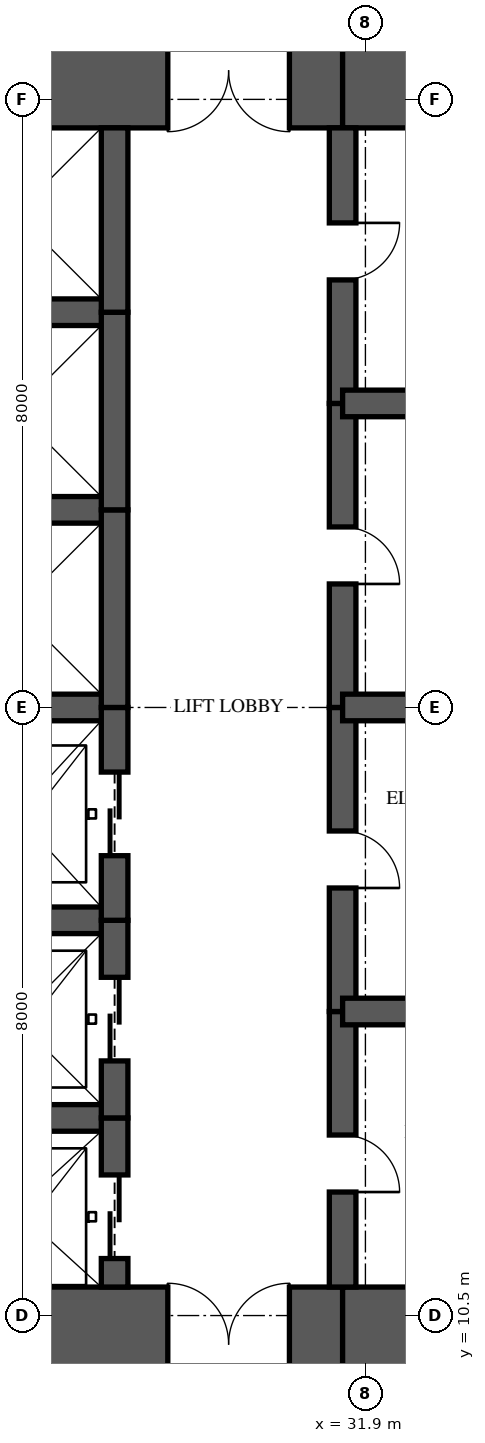
"""IFC4 building model, lengths in metres.
Left out: names, types, materials, properties, quantities, classifications, styles, units other than length and angle.
Written with IfcOpenShell. Run it as: python <this file> out.ifc"""

import sys

from ifc_helpers import new_model, si_unit, direction, frame, frame_2d, origin, place, context, subcontext, project, spatial, rectangle, extrude, element, fill, save


model = new_model("IFC4")
c1 = context("Model", 3, precision=1e-05, world=origin(), true_north=direction((0.0, 1.0)))
c2 = subcontext(c1, "Body", "Model", "MODEL_VIEW")
j1 = project(units=[si_unit("LENGTHUNIT", "METRE"), si_unit("PLANEANGLEUNIT", "RADIAN")], contexts=[c1])
p1 = place(None, origin())
s1 = spatial("IfcSite", under=j1, at=p1, CompositionType="ELEMENT")
p2 = place(p1, origin())
s2 = spatial("IfcBuilding", under=s1, at=p2, CompositionType="ELEMENT")
p3 = place(p2, frame((0.0, 0.0, 124.95)))
s3 = spatial("IfcBuildingStorey", under=s2, at=p3, CompositionType="ELEMENT", Elevation=124.95)
p4 = place(p3, frame((26.0, 10.125, 0.0), z_axis=(0.0, 0.0, 1.0), x_axis=(1.0, 0.0, 0.0)))
e1 = element("IfcWall", 1, at=p4, inside=s3, PredefinedType="SHEAR", context=c2, shape_type="SweptSolid", body=[
    extrude(rectangle(XDim=5.6, YDim=1.5, at=frame_2d((2.8, 0.0))), origin(), (0.0, 0.0, 1.0), 3.35),
])
p5 = place(p4, frame((3.3, 0.0, 0.0)))
e2 = element("IfcOpeningElement", 2, at=p5, cuts=e1, PredefinedType="OPENING", context=c2, shape_type="SweptSolid", body=[
    extrude(rectangle(XDim=1.6, YDim=2.1, at=frame_2d((0.8, 1.05))), frame((0.0, 0.76, 0.0), z_axis=(0.0, -1.0, 0.0), x_axis=(1.0, 0.0, 0.0)), (0.0, 0.0, 1.0), 1.52),
])
for number, where, z_axis, x_axis in (
    (3, (31.6, 10.125, 0.0), (0.0, 0.0, 1.0), (1.0, 0.0, 0.0)),
    (4, (35.9, 26.875, 0.0), (0.0, 0.0, 1.0), (-1.0, 0.0, 0.0)),
):
    element("IfcWall", number, at=place(p3, frame(where, z_axis=z_axis, x_axis=x_axis)), inside=s3, PredefinedType="SHEAR", context=c2, shape_type="SweptSolid", body=[
        extrude(rectangle(XDim=4.3, YDim=1.5, at=frame_2d((2.15, 0.0))), origin(), (0.0, 0.0, 1.0), 3.35),
    ])
p6 = place(p3, frame((31.6, 26.875, 0.0), z_axis=(0.0, 0.0, 1.0), x_axis=(-1.0, 0.0, 0.0)))
e5 = element("IfcWall", 5, at=p6, inside=s3, PredefinedType="SHEAR", context=c2, shape_type="SweptSolid", body=[
    extrude(rectangle(XDim=5.6, YDim=1.5, at=frame_2d((2.8, 0.0))), origin(), (0.0, 0.0, 1.0), 3.35),
])
p7 = place(p6, frame((0.7, 0.0, 0.0)))
e6 = element("IfcOpeningElement", 6, at=p7, cuts=e5, PredefinedType="OPENING", context=c2, shape_type="SweptSolid", body=[
    extrude(rectangle(XDim=1.6, YDim=2.1, at=frame_2d((0.8, 1.05))), frame((0.0, 0.76, 0.0), z_axis=(0.0, -1.0, 0.0), x_axis=(1.0, 0.0, 0.0)), (0.0, 0.0, 1.0), 1.52),
])
p8 = place(p3, frame((28.6, 10.875, 0.0), z_axis=(0.0, 0.0, 1.0), x_axis=(0.0, 1.0, 0.0)))
e7 = element("IfcWall", 7, at=p8, inside=s3, PredefinedType="SHEAR", context=c2, shape_type="SweptSolid", body=[
    extrude(rectangle(XDim=2.225, YDim=0.35, at=frame_2d((1.113, 0.0))), origin(), (0.0, 0.0, 1.0), 3.35),
])
p9 = place(p8, frame((0.375, 0.0, 0.0)))
e8 = element("IfcOpeningElement", 8, at=p9, cuts=e7, PredefinedType="OPENING", context=c2, shape_type="SweptSolid", body=[
    extrude(rectangle(XDim=1.1, YDim=2.1, at=frame_2d((0.55, 1.05))), frame((0.0, 0.185, 0.0), z_axis=(0.0, -1.0, 0.0), x_axis=(1.0, 0.0, 0.0)), (0.0, 0.0, 1.0), 0.37),
])
p10 = place(p3, frame((28.6, 13.1, 0.0), z_axis=(0.0, 0.0, 1.0), x_axis=(0.0, 1.0, 0.0)))
e9 = element("IfcWall", 9, at=p10, inside=s3, PredefinedType="SHEAR", context=c2, shape_type="SweptSolid", body=[
    extrude(rectangle(XDim=2.6, YDim=0.35, at=frame_2d((1.3, 0.0))), origin(), (0.0, 0.0, 1.0), 3.35),
])
p11 = place(p10, frame((0.75, 0.0, 0.0)))
e10 = element("IfcOpeningElement", 10, at=p11, cuts=e9, PredefinedType="OPENING", context=c2, shape_type="SweptSolid", body=[
    extrude(rectangle(XDim=1.1, YDim=2.1, at=frame_2d((0.55, 1.05))), frame((0.0, 0.185, 0.0), z_axis=(0.0, -1.0, 0.0), x_axis=(1.0, 0.0, 0.0)), (0.0, 0.0, 1.0), 0.37),
])
p12 = place(p3, frame((28.6, 15.7, 0.0), z_axis=(0.0, 0.0, 1.0), x_axis=(0.0, 1.0, 0.0)))
e11 = element("IfcWall", 11, at=p12, inside=s3, PredefinedType="SHEAR", context=c2, shape_type="SweptSolid", body=[
    extrude(rectangle(XDim=2.8, YDim=0.35, at=frame_2d((1.4, 0.0))), origin(), (0.0, 0.0, 1.0), 3.35),
])
p13 = place(p12, frame((0.85, 0.0, 0.0)))
e12 = element("IfcOpeningElement", 12, at=p13, cuts=e11, PredefinedType="OPENING", context=c2, shape_type="SweptSolid", body=[
    extrude(rectangle(XDim=1.1, YDim=2.1, at=frame_2d((0.55, 1.05))), frame((0.0, 0.185, 0.0), z_axis=(0.0, -1.0, 0.0), x_axis=(1.0, 0.0, 0.0)), (0.0, 0.0, 1.0), 0.37),
])
p14 = place(p3, frame((28.6, 18.5, 0.0), z_axis=(0.0, 0.0, 1.0), x_axis=(0.0, 1.0, 0.0)))
e13 = element("IfcWall", 13, at=p14, inside=s3, PredefinedType="SHEAR", context=c2, shape_type="SweptSolid", body=[
    extrude(rectangle(XDim=2.6, YDim=0.35, at=frame_2d((1.3, 0.0))), origin(), (0.0, 0.0, 1.0), 3.35),
])
p15 = place(p3, frame((28.6, 21.1, 0.0), z_axis=(0.0, 0.0, 1.0), x_axis=(0.0, 1.0, 0.0)))
e14 = element("IfcWall", 14, at=p15, inside=s3, PredefinedType="SHEAR", context=c2, shape_type="SweptSolid", body=[
    extrude(rectangle(XDim=2.6, YDim=0.35, at=frame_2d((1.3, 0.0))), origin(), (0.0, 0.0, 1.0), 3.35),
])
p16 = place(p3, frame((28.6, 23.7, 0.0), z_axis=(0.0, 0.0, 1.0), x_axis=(0.0, 1.0, 0.0)))
e15 = element("IfcWall", 15, at=p16, inside=s3, PredefinedType="SHEAR", context=c2, shape_type="SweptSolid", body=[
    extrude(rectangle(XDim=2.425, YDim=0.35, at=frame_2d((1.212, 0.0))), origin(), (0.0, 0.0, 1.0), 3.35),
])
p17 = place(p3, frame((31.6, 10.875, 0.0), z_axis=(0.0, 0.0, 1.0), x_axis=(0.0, 1.0, 0.0)))
e16 = element("IfcWall", 16, at=p17, inside=s3, PredefinedType="SHEAR", context=c2, shape_type="SweptSolid", body=[
    extrude(rectangle(XDim=3.625, YDim=0.35, at=frame_2d((1.812, 0.0))), origin(), (0.0, 0.0, 1.0), 3.35),
])
p18 = place(p17, frame((1.25, 0.0, 0.0)))
e17 = element("IfcOpeningElement", 17, at=p18, cuts=e16, PredefinedType="OPENING", context=c2, shape_type="SweptSolid", body=[
    extrude(rectangle(XDim=0.75, YDim=2.1, at=frame_2d((0.375, 1.05))), frame((0.0, 0.185, 0.0), z_axis=(0.0, -1.0, 0.0), x_axis=(1.0, 0.0, 0.0)), (0.0, 0.0, 1.0), 0.37),
])
p19 = place(p3, frame((31.6, 14.5, 0.0), z_axis=(0.0, 0.0, 1.0), x_axis=(0.0, 1.0, 0.0)))
e18 = element("IfcWall", 18, at=p19, inside=s3, PredefinedType="SHEAR", context=c2, shape_type="SweptSolid", body=[
    extrude(rectangle(XDim=4.0, YDim=0.35, at=frame_2d((2.0, 0.0))), origin(), (0.0, 0.0, 1.0), 3.35),
])
p20 = place(p19, frame((1.625, 0.0, 0.0)))
e19 = element("IfcOpeningElement", 19, at=p20, cuts=e18, PredefinedType="OPENING", context=c2, shape_type="SweptSolid", body=[
    extrude(rectangle(XDim=0.75, YDim=2.1, at=frame_2d((0.375, 1.05))), frame((0.0, 0.185, 0.0), z_axis=(0.0, -1.0, 0.0), x_axis=(1.0, 0.0, 0.0)), (0.0, 0.0, 1.0), 0.37),
])
p21 = place(p3, frame((31.6, 18.5, 0.0), z_axis=(0.0, 0.0, 1.0), x_axis=(0.0, 1.0, 0.0)))
e20 = element("IfcWall", 20, at=p21, inside=s3, PredefinedType="SHEAR", context=c2, shape_type="SweptSolid", body=[
    extrude(rectangle(XDim=4.0, YDim=0.35, at=frame_2d((2.0, 0.0))), origin(), (0.0, 0.0, 1.0), 3.35),
])
p22 = place(p21, frame((1.625, 0.0, 0.0)))
e21 = element("IfcOpeningElement", 21, at=p22, cuts=e20, PredefinedType="OPENING", context=c2, shape_type="SweptSolid", body=[
    extrude(rectangle(XDim=0.75, YDim=2.1, at=frame_2d((0.375, 1.05))), frame((0.0, 0.185, 0.0), z_axis=(0.0, -1.0, 0.0), x_axis=(1.0, 0.0, 0.0)), (0.0, 0.0, 1.0), 0.37),
])
p23 = place(p3, frame((31.6, 22.5, 0.0), z_axis=(0.0, 0.0, 1.0), x_axis=(0.0, 1.0, 0.0)))
e22 = element("IfcWall", 22, at=p23, inside=s3, PredefinedType="SHEAR", context=c2, shape_type="SweptSolid", body=[
    extrude(rectangle(XDim=3.625, YDim=0.35, at=frame_2d((1.812, 0.0))), origin(), (0.0, 0.0, 1.0), 3.35),
])
p24 = place(p23, frame((1.625, 0.0, 0.0)))
e23 = element("IfcOpeningElement", 23, at=p24, cuts=e22, PredefinedType="OPENING", context=c2, shape_type="SweptSolid", body=[
    extrude(rectangle(XDim=0.75, YDim=2.1, at=frame_2d((0.375, 1.05))), frame((0.0, 0.185, 0.0), z_axis=(0.0, -1.0, 0.0), x_axis=(1.0, 0.0, 0.0)), (0.0, 0.0, 1.0), 0.37),
])
for number, where, z_axis, x_axis in (
    (24, (26.0, 13.1, 0.0), (0.0, 0.0, 1.0), (1.0, 0.0, 0.0)),
    (25, (26.0, 15.7, 0.0), (0.0, 0.0, 1.0), (1.0, 0.0, 0.0)),
    (26, (26.0, 18.5, 0.0), (0.0, 0.0, 1.0), (1.0, 0.0, 0.0)),
    (27, (26.0, 21.1, 0.0), (0.0, 0.0, 1.0), (1.0, 0.0, 0.0)),
    (28, (26.0, 23.7, 0.0), (0.0, 0.0, 1.0), (1.0, 0.0, 0.0)),
):
    element("IfcWall", number, at=place(p3, frame(where, z_axis=z_axis, x_axis=x_axis)), inside=s3, PredefinedType="SHEAR", context=c2, shape_type="SweptSolid", body=[
        extrude(rectangle(XDim=2.6, YDim=0.35, at=frame_2d((1.3, 0.0))), origin(), (0.0, 0.0, 1.0), 3.35),
    ])
for number, where, z_axis, x_axis in (
    (29, (31.6, 14.5, 0.0), (0.0, 0.0, 1.0), (1.0, 0.0, 0.0)),
    (30, (31.6, 18.5, 0.0), (0.0, 0.0, 1.0), (1.0, 0.0, 0.0)),
    (31, (31.6, 22.5, 0.0), (0.0, 0.0, 1.0), (1.0, 0.0, 0.0)),
):
    element("IfcWall", number, at=place(p3, frame(where, z_axis=z_axis, x_axis=x_axis)), inside=s3, PredefinedType="SHEAR", context=c2, shape_type="SweptSolid", body=[
        extrude(rectangle(XDim=4.3, YDim=0.35, at=frame_2d((2.15, 0.0))), origin(), (0.0, 0.0, 1.0), 3.35),
    ])
p25 = place(p9, origin())
e32 = element("IfcDoor", 32, at=p25, inside=s3, OperationType="SLIDING_TO_LEFT", PredefinedType="DOOR", context=c2, shape_type="SweptSolid", body=[
    extrude(rectangle(XDim=1.1, YDim=2.1, at=frame_2d((0.55, 1.05))), frame((0.0, 0.025, 0.0), z_axis=(0.0, -1.0, 0.0), x_axis=(1.0, 0.0, 0.0)), (0.0, 0.0, 1.0), 0.05),
])
fill(e8, e32)
p26 = place(p11, origin())
e33 = element("IfcDoor", 33, at=p26, inside=s3, OperationType="SLIDING_TO_LEFT", PredefinedType="DOOR", context=c2, shape_type="SweptSolid", body=[
    extrude(rectangle(XDim=1.1, YDim=2.1, at=frame_2d((0.55, 1.05))), frame((0.0, 0.025, 0.0), z_axis=(0.0, -1.0, 0.0), x_axis=(1.0, 0.0, 0.0)), (0.0, 0.0, 1.0), 0.05),
])
fill(e10, e33)
p27 = place(p13, origin())
e34 = element("IfcDoor", 34, at=p27, inside=s3, OperationType="SLIDING_TO_LEFT", PredefinedType="DOOR", context=c2, shape_type="SweptSolid", body=[
    extrude(rectangle(XDim=1.1, YDim=2.1, at=frame_2d((0.55, 1.05))), frame((0.0, 0.025, 0.0), z_axis=(0.0, -1.0, 0.0), x_axis=(1.0, 0.0, 0.0)), (0.0, 0.0, 1.0), 0.05),
])
fill(e12, e34)
p28 = place(p5, origin())
e35 = element("IfcDoor", 35, at=p28, inside=s3, OperationType="DOUBLE_DOOR_SINGLE_SWING", PredefinedType="DOOR", context=c2, shape_type="SweptSolid", body=[
    extrude(rectangle(XDim=1.6, YDim=2.1, at=frame_2d((0.8, 1.05))), frame((0.0, 0.025, 0.0), z_axis=(0.0, -1.0, 0.0), x_axis=(1.0, 0.0, 0.0)), (0.0, 0.0, 1.0), 0.05),
])
fill(e2, e35)
p29 = place(p7, origin())
e36 = element("IfcDoor", 36, at=p29, inside=s3, OperationType="DOUBLE_DOOR_SINGLE_SWING", PredefinedType="DOOR", context=c2, shape_type="SweptSolid", body=[
    extrude(rectangle(XDim=1.6, YDim=2.1, at=frame_2d((0.8, 1.05))), frame((0.0, 0.025, 0.0), z_axis=(0.0, -1.0, 0.0), x_axis=(1.0, 0.0, 0.0)), (0.0, 0.0, 1.0), 0.05),
])
fill(e6, e36)
p30 = place(p18, frame((0.75, 0.0, 0.0), z_axis=(0.0, 0.0, 1.0), x_axis=(-1.0, 0.0, 0.0)))
e37 = element("IfcDoor", 37, at=p30, inside=s3, OperationType="SINGLE_SWING_RIGHT", PredefinedType="DOOR", context=c2, shape_type="SweptSolid", body=[
    extrude(rectangle(XDim=0.75, YDim=2.1, at=frame_2d((0.375, 1.05))), frame((0.0, 0.025, 0.0), z_axis=(0.0, -1.0, 0.0), x_axis=(1.0, 0.0, 0.0)), (0.0, 0.0, 1.0), 0.05),
])
fill(e17, e37)
p31 = place(p20, frame((0.75, 0.0, 0.0), z_axis=(0.0, 0.0, 1.0), x_axis=(-1.0, 0.0, 0.0)))
e38 = element("IfcDoor", 38, at=p31, inside=s3, OperationType="SINGLE_SWING_RIGHT", PredefinedType="DOOR", context=c2, shape_type="SweptSolid", body=[
    extrude(rectangle(XDim=0.75, YDim=2.1, at=frame_2d((0.375, 1.05))), frame((0.0, 0.025, 0.0), z_axis=(0.0, -1.0, 0.0), x_axis=(1.0, 0.0, 0.0)), (0.0, 0.0, 1.0), 0.05),
])
fill(e19, e38)
p32 = place(p22, frame((0.75, 0.0, 0.0), z_axis=(0.0, 0.0, 1.0), x_axis=(-1.0, 0.0, 0.0)))
e39 = element("IfcDoor", 39, at=p32, inside=s3, OperationType="SINGLE_SWING_RIGHT", PredefinedType="DOOR", context=c2, shape_type="SweptSolid", body=[
    extrude(rectangle(XDim=0.75, YDim=2.1, at=frame_2d((0.375, 1.05))), frame((0.0, 0.025, 0.0), z_axis=(0.0, -1.0, 0.0), x_axis=(1.0, 0.0, 0.0)), (0.0, 0.0, 1.0), 0.05),
])
fill(e21, e39)
p33 = place(p24, frame((0.75, 0.0, 0.0), z_axis=(0.0, 0.0, 1.0), x_axis=(-1.0, 0.0, 0.0)))
e40 = element("IfcDoor", 40, at=p33, inside=s3, OperationType="SINGLE_SWING_LEFT", PredefinedType="DOOR", context=c2, shape_type="SweptSolid", body=[
    extrude(rectangle(XDim=0.75, YDim=2.1, at=frame_2d((0.375, 1.05))), frame((0.0, 0.025, 0.0), z_axis=(0.0, -1.0, 0.0), x_axis=(1.0, 0.0, 0.0)), (0.0, 0.0, 1.0), 0.05),
])
fill(e23, e40)
save(model, sys.argv[1])
